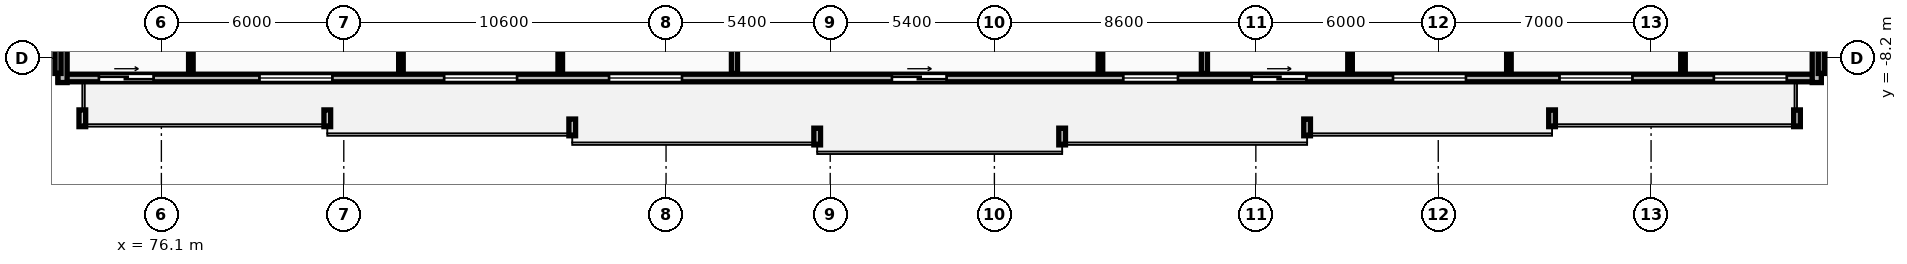
"""IFC4 building model, lengths in metres.
Left out: names, types, materials, properties, quantities, classifications, styles, units other than length and angle.
Written with IfcOpenShell. Run it as: python <this file> out.ifc"""

import sys

from ifc_helpers import new_model, si_unit, direction, frame, frame_2d, origin, place, context, subcontext, project, spatial, rectangle, extrude, element, fill, save


model = new_model("IFC4")
c1 = context("Model", 3, precision=1e-05, world=origin(), true_north=direction((0.0, 1.0)))
c2 = subcontext(c1, "Body", "Model", "MODEL_VIEW")
j1 = project(units=[si_unit("LENGTHUNIT", "METRE"), si_unit("PLANEANGLEUNIT", "RADIAN")], contexts=[c1])
p1 = place(None, origin())
s1 = spatial("IfcSite", under=j1, at=p1, CompositionType="ELEMENT")
p2 = place(p1, origin())
s2 = spatial("IfcBuilding", under=s1, at=p2, CompositionType="ELEMENT")
p3 = place(p2, frame((0.0, 0.0, 139.3)))
s3 = spatial("IfcBuildingStorey", under=s2, at=p3, CompositionType="ELEMENT", Elevation=139.3)
p4 = place(p3, frame((72.7, -8.85, 0.0), z_axis=(0.0, 0.0, 1.0), x_axis=(1.0, 0.0, 0.0)))
e1 = element("IfcWall", 1, at=p4, inside=s3, PredefinedType="STANDARD", context=c2, shape_type="SweptSolid", body=[
    extrude(rectangle(XDim=58.0, YDim=0.25, at=frame_2d((29.0, 0.0))), origin(), (0.0, 0.0, 1.0), 3.31),
])
p5 = place(p4, frame((6.625, 0.0, 0.85)))
e2 = element("IfcOpeningElement", 2, at=p5, cuts=e1, PredefinedType="OPENING", context=c2, shape_type="SweptSolid", body=[
    extrude(rectangle(XDim=2.4, YDim=1.9, at=frame_2d((1.2, 0.95))), frame((0.0, 0.135, 0.0), z_axis=(0.0, -1.0, 0.0), x_axis=(1.0, 0.0, 0.0)), (0.0, 0.0, 1.0), 0.27),
])
p6 = place(p4, frame((12.7, 0.0, 0.85)))
e3 = element("IfcOpeningElement", 3, at=p6, cuts=e1, PredefinedType="OPENING", context=c2, shape_type="SweptSolid", body=[
    extrude(rectangle(XDim=2.4, YDim=1.9, at=frame_2d((1.2, 0.95))), frame((0.0, 0.135, 0.0), z_axis=(0.0, -1.0, 0.0), x_axis=(1.0, 0.0, 0.0)), (0.0, 0.0, 1.0), 0.27),
])
p7 = place(p4, frame((1.345, 0.0, 0.0)))
e4 = element("IfcOpeningElement", 4, at=p7, cuts=e1, PredefinedType="OPENING", context=c2, shape_type="SweptSolid", body=[
    extrude(rectangle(XDim=1.8, YDim=2.2, at=frame_2d((0.9, 1.1))), frame((0.0, 0.135, 0.0), z_axis=(0.0, -1.0, 0.0), x_axis=(1.0, 0.0, 0.0)), (0.0, 0.0, 1.0), 0.27),
])
p8 = place(p4, frame((18.125, 0.0, 0.85)))
e5 = element("IfcOpeningElement", 5, at=p8, cuts=e1, PredefinedType="OPENING", context=c2, shape_type="SweptSolid", body=[
    extrude(rectangle(XDim=2.4, YDim=1.9, at=frame_2d((1.2, 0.95))), frame((0.0, 0.135, 0.0), z_axis=(0.0, -1.0, 0.0), x_axis=(1.0, 0.0, 0.0)), (0.0, 0.0, 1.0), 0.27),
])
p9 = place(p4, frame((27.429, 0.0, 0.0)))
e6 = element("IfcOpeningElement", 6, at=p9, cuts=e1, PredefinedType="OPENING", context=c2, shape_type="SweptSolid", body=[
    extrude(rectangle(XDim=1.8, YDim=2.2, at=frame_2d((0.9, 1.1))), frame((0.0, 0.135, 0.0), z_axis=(0.0, -1.0, 0.0), x_axis=(1.0, 0.0, 0.0)), (0.0, 0.0, 1.0), 0.27),
])
p10 = place(p4, frame((35.038, 0.0, 0.85)))
e7 = element("IfcOpeningElement", 7, at=p10, cuts=e1, PredefinedType="OPENING", context=c2, shape_type="SweptSolid", body=[
    extrude(rectangle(XDim=1.8, YDim=1.8, at=frame_2d((0.9, 0.9))), frame((0.0, 0.135, 0.0), z_axis=(0.0, -1.0, 0.0), x_axis=(1.0, 0.0, 0.0)), (0.0, 0.0, 1.0), 0.27),
])
p11 = place(p4, frame((43.911, 0.0, 0.85)))
e8 = element("IfcOpeningElement", 8, at=p11, cuts=e1, PredefinedType="OPENING", context=c2, shape_type="SweptSolid", body=[
    extrude(rectangle(XDim=2.4, YDim=1.9, at=frame_2d((1.2, 0.95))), frame((0.0, 0.135, 0.0), z_axis=(0.0, -1.0, 0.0), x_axis=(1.0, 0.0, 0.0)), (0.0, 0.0, 1.0), 0.27),
])
p12 = place(p4, frame((49.387, 0.0, 0.85)))
e9 = element("IfcOpeningElement", 9, at=p12, cuts=e1, PredefinedType="OPENING", context=c2, shape_type="SweptSolid", body=[
    extrude(rectangle(XDim=2.4, YDim=1.9, at=frame_2d((1.2, 0.95))), frame((0.0, 0.135, 0.0), z_axis=(0.0, -1.0, 0.0), x_axis=(1.0, 0.0, 0.0)), (0.0, 0.0, 1.0), 0.27),
])
p13 = place(p4, frame((39.263, 0.0, 0.0)))
e10 = element("IfcOpeningElement", 10, at=p13, cuts=e1, PredefinedType="OPENING", context=c2, shape_type="SweptSolid", body=[
    extrude(rectangle(XDim=1.8, YDim=2.2, at=frame_2d((0.9, 1.1))), frame((0.0, 0.135, 0.0), z_axis=(0.0, -1.0, 0.0), x_axis=(1.0, 0.0, 0.0)), (0.0, 0.0, 1.0), 0.27),
])
p14 = place(p4, frame((54.465, 0.0, 0.85)))
e11 = element("IfcOpeningElement", 11, at=p14, cuts=e1, PredefinedType="OPENING", context=c2, shape_type="SweptSolid", body=[
    extrude(rectangle(XDim=2.4, YDim=1.9, at=frame_2d((1.2, 0.95))), frame((0.0, 0.135, 0.0), z_axis=(0.0, -1.0, 0.0), x_axis=(1.0, 0.0, 0.0)), (0.0, 0.0, 1.0), 0.27),
])
for number, where, z_axis, x_axis in (
    (12, (130.55, -9.0, 0.0), (0.0, 0.0, 1.0), (0.0, 1.0, 0.0)),
    (13, (72.85, -5.4, 0.0), (0.0, 0.0, 1.0), (0.0, -1.0, 0.0)),
):
    element("IfcWall", number, at=place(p3, frame(where, z_axis=z_axis, x_axis=x_axis)), inside=s3, PredefinedType="STANDARD", context=c2, shape_type="SweptSolid", body=[
        extrude(rectangle(XDim=3.6, YDim=0.3, at=frame_2d((1.8, 0.0))), origin(), (0.0, 0.0, 1.0), 3.31),
    ])
for number, where, z_axis, x_axis in (
    (14, (72.7, -8.7, 0.0), (0.0, 0.0, 1.0), (0.0, 1.0, 0.0)),
    (15, (130.7, -8.7, 0.0), (0.0, 0.0, 1.0), (0.0, 1.0, 0.0)),
    (16, (94.95, -8.7, 0.0), (0.0, 0.0, 1.0), (0.0, 1.0, 0.0)),
):
    element("IfcWall", number, at=place(p3, frame(where, z_axis=z_axis, x_axis=x_axis)), inside=s3, PredefinedType="PARTITIONING", context=c2, shape_type="SweptSolid", body=[
        extrude(rectangle(XDim=24.57, YDim=0.2, at=frame_2d((12.285, 0.0))), origin(), (0.0, 0.0, 1.0), 3.31),
    ])
p15 = place(p3, frame((83.98, -8.7, 0.0), z_axis=(0.0, 0.0, 1.0), x_axis=(0.0, 1.0, 0.0)))
e17 = element("IfcWall", 17, at=p15, inside=s3, PredefinedType="PARTITIONING", context=c2, shape_type="SweptSolid", body=[
    extrude(rectangle(XDim=4.82, YDim=0.15, at=frame_2d((2.41, 0.0))), origin(), (0.0, 0.0, 1.0), 3.31),
])
p16 = place(p3, frame((77.07, -8.7, 0.0), z_axis=(0.0, 0.0, 1.0), x_axis=(0.0, 1.0, 0.0)))
e18 = element("IfcWall", 18, at=p16, inside=s3, PredefinedType="PARTITIONING", context=c2, shape_type="SweptSolid", body=[
    extrude(rectangle(XDim=9.96, YDim=0.15, at=frame_2d((4.98, 0.0))), origin(), (0.0, 0.0, 1.0), 3.31),
])
p17 = place(p16, frame((5.22, 0.0, 0.0)))
e19 = element("IfcOpeningElement", 19, at=p17, cuts=e18, PredefinedType="OPENING", context=c2, shape_type="SweptSolid", body=[
    extrude(rectangle(XDim=0.92, YDim=2.08, at=frame_2d((0.46, 1.04))), frame((0.0, 0.085, 0.0), z_axis=(0.0, -1.0, 0.0), x_axis=(1.0, 0.0, 0.0)), (0.0, 0.0, 1.0), 0.17),
])
p18 = place(p3, frame((89.22, -8.7, 0.0), z_axis=(0.0, 0.0, 1.0), x_axis=(0.0, 1.0, 0.0)))
e20 = element("IfcWall", 20, at=p18, inside=s3, PredefinedType="PARTITIONING", context=c2, shape_type="SweptSolid", body=[
    extrude(rectangle(XDim=7.34, YDim=0.15, at=frame_2d((3.67, 0.0))), origin(), (0.0, 0.0, 1.0), 3.31),
])
p19 = place(p18, frame((5.897, 0.0, 0.0)))
e21 = element("IfcOpeningElement", 21, at=p19, cuts=e20, PredefinedType="OPENING", context=c2, shape_type="SweptSolid", body=[
    extrude(rectangle(XDim=0.92, YDim=2.08, at=frame_2d((0.46, 1.04))), frame((0.0, 0.085, 0.0), z_axis=(0.0, -1.0, 0.0), x_axis=(1.0, 0.0, 0.0)), (0.0, 0.0, 1.0), 0.17),
])
p20 = place(p3, frame((110.408, -8.7, 0.0), z_axis=(0.0, 0.0, 1.0), x_axis=(0.0, 1.0, 0.0)))
e22 = element("IfcWall", 22, at=p20, inside=s3, PredefinedType="PARTITIONING", context=c2, shape_type="SweptSolid", body=[
    extrude(rectangle(XDim=24.57, YDim=0.2, at=frame_2d((12.285, 0.0))), origin(), (0.0, 0.0, 1.0), 3.31),
])
p21 = place(p3, frame((106.988, -8.7, 0.0), z_axis=(0.0, 0.0, 1.0), x_axis=(0.0, 1.0, 0.0)))
e23 = element("IfcWall", 23, at=p21, inside=s3, PredefinedType="PARTITIONING", context=c2, shape_type="SweptSolid", body=[
    extrude(rectangle(XDim=9.96, YDim=0.15, at=frame_2d((4.98, 0.0))), origin(), (0.0, 0.0, 1.0), 3.31),
])
p22 = place(p21, frame((5.894, 0.0, 0.0)))
e24 = element("IfcOpeningElement", 24, at=p22, cuts=e23, PredefinedType="OPENING", context=c2, shape_type="SweptSolid", body=[
    extrude(rectangle(XDim=0.84, YDim=2.04, at=frame_2d((0.42, 1.02))), frame((0.0, 0.085, 0.0), z_axis=(0.0, -1.0, 0.0), x_axis=(1.0, 0.0, 0.0)), (0.0, 0.0, 1.0), 0.17),
])
p23 = place(p21, frame((7.69, 0.0, 0.0)))
e25 = element("IfcOpeningElement", 25, at=p23, cuts=e23, PredefinedType="OPENING", context=c2, shape_type="SweptSolid", body=[
    extrude(rectangle(XDim=0.84, YDim=2.04, at=frame_2d((0.42, 1.02))), frame((0.0, 0.085, 0.0), z_axis=(0.0, -1.0, 0.0), x_axis=(1.0, 0.0, 0.0)), (0.0, 0.0, 1.0), 0.17),
])
p24 = place(p21, frame((2.223, 0.0, 0.0)))
e26 = element("IfcOpeningElement", 26, at=p24, cuts=e23, PredefinedType="OPENING", context=c2, shape_type="SweptSolid", body=[
    extrude(rectangle(XDim=0.88, YDim=2.06, at=frame_2d((0.44, 1.03))), frame((0.0, 0.085, 0.0), z_axis=(0.0, -1.0, 0.0), x_axis=(1.0, 0.0, 0.0)), (0.0, 0.0, 1.0), 0.17),
])
p25 = place(p3, frame((120.424, -8.7, 0.0), z_axis=(0.0, 0.0, 1.0), x_axis=(0.0, 1.0, 0.0)))
e27 = element("IfcWall", 27, at=p25, inside=s3, PredefinedType="PARTITIONING", context=c2, shape_type="SweptSolid", body=[
    extrude(rectangle(XDim=4.82, YDim=0.15, at=frame_2d((2.41, 0.0))), origin(), (0.0, 0.0, 1.0), 3.31),
])
p26 = place(p3, frame((115.198, -8.7, 0.0), z_axis=(0.0, 0.0, 1.0), x_axis=(0.0, 1.0, 0.0)))
e28 = element("IfcWall", 28, at=p26, inside=s3, PredefinedType="PARTITIONING", context=c2, shape_type="SweptSolid", body=[
    extrude(rectangle(XDim=9.96, YDim=0.15, at=frame_2d((4.98, 0.0))), origin(), (0.0, 0.0, 1.0), 3.31),
])
p27 = place(p26, frame((5.22, 0.0, 0.0)))
e29 = element("IfcOpeningElement", 29, at=p27, cuts=e28, PredefinedType="OPENING", context=c2, shape_type="SweptSolid", body=[
    extrude(rectangle(XDim=0.92, YDim=2.08, at=frame_2d((0.46, 1.04))), frame((0.0, 0.085, 0.0), z_axis=(0.0, -1.0, 0.0), x_axis=(1.0, 0.0, 0.0)), (0.0, 0.0, 1.0), 0.17),
])
p28 = place(p3, frame((126.15, -8.7, 0.0), z_axis=(0.0, 0.0, 1.0), x_axis=(0.0, 1.0, 0.0)))
e30 = element("IfcWall", 30, at=p28, inside=s3, PredefinedType="PARTITIONING", context=c2, shape_type="SweptSolid", body=[
    extrude(rectangle(XDim=7.23, YDim=0.15, at=frame_2d((3.615, 0.0))), origin(), (0.0, 0.0, 1.0), 3.31),
])
p29 = place(p28, frame((5.22, 0.0, 0.0)))
e31 = element("IfcOpeningElement", 31, at=p29, cuts=e30, PredefinedType="OPENING", context=c2, shape_type="SweptSolid", body=[
    extrude(rectangle(XDim=0.92, YDim=2.08, at=frame_2d((0.46, 1.04))), frame((0.0, 0.085, 0.0), z_axis=(0.0, -1.0, 0.0), x_axis=(1.0, 0.0, 0.0)), (0.0, 0.0, 1.0), 0.17),
])
p30 = place(p5, origin())
e32 = element("IfcWindow", 32, at=p30, inside=s3, PartitioningType="DOUBLE_PANEL_VERTICAL", PredefinedType="WINDOW", context=c2, shape_type="SweptSolid", body=[
    extrude(rectangle(XDim=2.4, YDim=1.9, at=frame_2d((1.2, 0.95))), frame((0.0, 0.03, 0.0), z_axis=(0.0, -1.0, 0.0), x_axis=(1.0, 0.0, 0.0)), (0.0, 0.0, 1.0), 0.06),
])
fill(e2, e32)
p31 = place(p6, origin())
e33 = element("IfcWindow", 33, at=p31, inside=s3, PartitioningType="DOUBLE_PANEL_VERTICAL", PredefinedType="WINDOW", context=c2, shape_type="SweptSolid", body=[
    extrude(rectangle(XDim=2.4, YDim=1.9, at=frame_2d((1.2, 0.95))), frame((0.0, 0.03, 0.0), z_axis=(0.0, -1.0, 0.0), x_axis=(1.0, 0.0, 0.0)), (0.0, 0.0, 1.0), 0.06),
])
fill(e3, e33)
p32 = place(p7, origin())
e34 = element("IfcDoor", 34, at=p32, inside=s3, OperationType="SLIDING_TO_RIGHT", PredefinedType="DOOR", context=c2, shape_type="SweptSolid", body=[
    extrude(rectangle(XDim=1.8, YDim=2.2, at=frame_2d((0.9, 1.1))), frame((0.0, 0.025, 0.0), z_axis=(0.0, -1.0, 0.0), x_axis=(1.0, 0.0, 0.0)), (0.0, 0.0, 1.0), 0.05),
])
fill(e4, e34)
p33 = place(p8, origin())
e35 = element("IfcWindow", 35, at=p33, inside=s3, PartitioningType="DOUBLE_PANEL_VERTICAL", PredefinedType="WINDOW", context=c2, shape_type="SweptSolid", body=[
    extrude(rectangle(XDim=2.4, YDim=1.9, at=frame_2d((1.2, 0.95))), frame((0.0, 0.03, 0.0), z_axis=(0.0, -1.0, 0.0), x_axis=(1.0, 0.0, 0.0)), (0.0, 0.0, 1.0), 0.06),
])
fill(e5, e35)
p34 = place(p9, origin())
e36 = element("IfcDoor", 36, at=p34, inside=s3, OperationType="SLIDING_TO_RIGHT", PredefinedType="DOOR", context=c2, shape_type="SweptSolid", body=[
    extrude(rectangle(XDim=1.8, YDim=2.2, at=frame_2d((0.9, 1.1))), frame((0.0, 0.025, 0.0), z_axis=(0.0, -1.0, 0.0), x_axis=(1.0, 0.0, 0.0)), (0.0, 0.0, 1.0), 0.05),
])
fill(e6, e36)
p35 = place(p10, origin())
e37 = element("IfcWindow", 37, at=p35, inside=s3, PartitioningType="SINGLE_PANEL", PredefinedType="WINDOW", context=c2, shape_type="SweptSolid", body=[
    extrude(rectangle(XDim=1.8, YDim=1.8, at=frame_2d((0.9, 0.9))), frame((0.0, 0.03, 0.0), z_axis=(0.0, -1.0, 0.0), x_axis=(1.0, 0.0, 0.0)), (0.0, 0.0, 1.0), 0.06),
])
fill(e7, e37)
p36 = place(p11, origin())
e38 = element("IfcWindow", 38, at=p36, inside=s3, PartitioningType="DOUBLE_PANEL_VERTICAL", PredefinedType="WINDOW", context=c2, shape_type="SweptSolid", body=[
    extrude(rectangle(XDim=2.4, YDim=1.9, at=frame_2d((1.2, 0.95))), frame((0.0, 0.03, 0.0), z_axis=(0.0, -1.0, 0.0), x_axis=(1.0, 0.0, 0.0)), (0.0, 0.0, 1.0), 0.06),
])
fill(e8, e38)
p37 = place(p12, origin())
e39 = element("IfcWindow", 39, at=p37, inside=s3, PartitioningType="DOUBLE_PANEL_VERTICAL", PredefinedType="WINDOW", context=c2, shape_type="SweptSolid", body=[
    extrude(rectangle(XDim=2.4, YDim=1.9, at=frame_2d((1.2, 0.95))), frame((0.0, 0.03, 0.0), z_axis=(0.0, -1.0, 0.0), x_axis=(1.0, 0.0, 0.0)), (0.0, 0.0, 1.0), 0.06),
])
fill(e9, e39)
p38 = place(p13, origin())
e40 = element("IfcDoor", 40, at=p38, inside=s3, OperationType="SLIDING_TO_RIGHT", PredefinedType="DOOR", context=c2, shape_type="SweptSolid", body=[
    extrude(rectangle(XDim=1.8, YDim=2.2, at=frame_2d((0.9, 1.1))), frame((0.0, 0.025, 0.0), z_axis=(0.0, -1.0, 0.0), x_axis=(1.0, 0.0, 0.0)), (0.0, 0.0, 1.0), 0.05),
])
fill(e10, e40)
p39 = place(p14, origin())
e41 = element("IfcWindow", 41, at=p39, inside=s3, PartitioningType="DOUBLE_PANEL_VERTICAL", PredefinedType="WINDOW", context=c2, shape_type="SweptSolid", body=[
    extrude(rectangle(XDim=2.4, YDim=1.9, at=frame_2d((1.2, 0.95))), frame((0.0, 0.03, 0.0), z_axis=(0.0, -1.0, 0.0), x_axis=(1.0, 0.0, 0.0)), (0.0, 0.0, 1.0), 0.06),
])
fill(e11, e41)
save(model, sys.argv[1])
